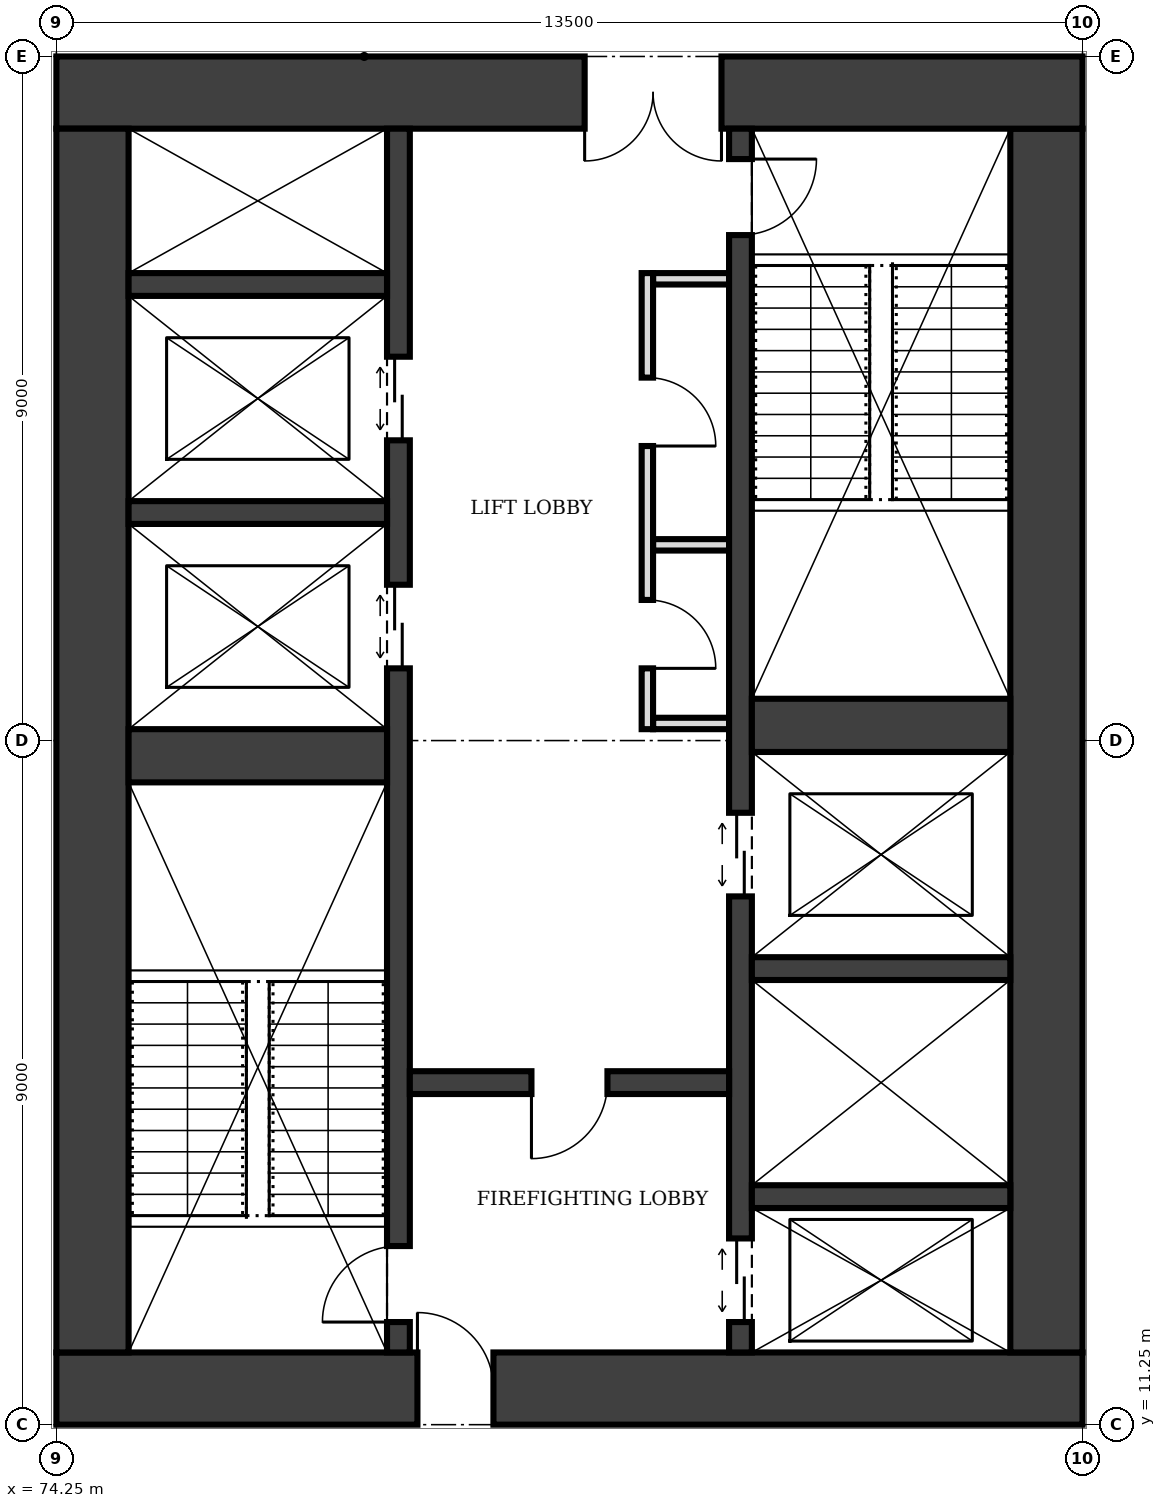
"""IFC4 building model, lengths in metres.
Left out: names, types, materials, properties, quantities, classifications, styles, units other than length and angle.
Written with IfcOpenShell. Run it as: python <this file> out.ifc"""

import sys

from ifc_helpers import new_model, si_unit, direction, frame, frame_2d, origin, place, context, subcontext, project, spatial, rectangle, extrude, element, fill, save


model = new_model("IFC4")
c1 = context("Model", 3, precision=1e-05, world=origin(), true_north=direction((0.0, 1.0)))
c2 = subcontext(c1, "Body", "Model", "MODEL_VIEW")
j1 = project(units=[si_unit("LENGTHUNIT", "METRE"), si_unit("PLANEANGLEUNIT", "RADIAN")], contexts=[c1])
p1 = place(None, origin())
s1 = spatial("IfcSite", under=j1, at=p1, CompositionType="ELEMENT")
p2 = place(p1, origin())
s2 = spatial("IfcBuilding", under=s1, at=p2, CompositionType="ELEMENT")
p3 = place(p2, frame((0.0, 0.0, 29.0)))
s3 = spatial("IfcBuildingStorey", under=s2, at=p3, CompositionType="ELEMENT", Elevation=29.0)
p4 = place(p3, frame((74.25, 11.725, 0.0), z_axis=(0.0, 0.0, 1.0), x_axis=(1.0, 0.0, 0.0)))
e1 = element("IfcWall", 1, at=p4, inside=s3, PredefinedType="SHEAR", context=c2, shape_type="SweptSolid", body=[
    extrude(rectangle(XDim=13.5, YDim=0.95, at=frame_2d((6.75, 0.0))), origin(), (0.0, 0.0, 1.0), 4.0),
])
p5 = place(p4, frame((4.75, 0.0, 0.0)))
e2 = element("IfcOpeningElement", 2, at=p5, cuts=e1, PredefinedType="OPENING", context=c2, shape_type="SweptSolid", body=[
    extrude(rectangle(XDim=1.0, YDim=2.1, at=frame_2d((0.5, 1.05))), frame((0.0, 0.485, 0.0), z_axis=(0.0, -1.0, 0.0), x_axis=(1.0, 0.0, 0.0)), (0.0, 0.0, 1.0), 0.97),
])
p6 = place(p3, frame((87.275, 12.2, 0.0), z_axis=(0.0, 0.0, 1.0), x_axis=(0.0, 1.0, 0.0)))
e3 = element("IfcWall", 3, at=p6, inside=s3, PredefinedType="SHEAR", context=c2, shape_type="SweptSolid", body=[
    extrude(rectangle(XDim=16.1, YDim=0.95, at=frame_2d((8.05, 0.0))), origin(), (0.0, 0.0, 1.0), 4.0),
])
p7 = place(p3, frame((87.75, 28.775, 0.0), z_axis=(0.0, 0.0, 1.0), x_axis=(-1.0, 0.0, 0.0)))
e4 = element("IfcWall", 4, at=p7, inside=s3, PredefinedType="SHEAR", context=c2, shape_type="SweptSolid", body=[
    extrude(rectangle(XDim=13.5, YDim=0.95, at=frame_2d((6.75, 0.0))), origin(), (0.0, 0.0, 1.0), 4.0),
])
p8 = place(p7, frame((4.75, 0.0, 0.0)))
e5 = element("IfcOpeningElement", 5, at=p8, cuts=e4, PredefinedType="OPENING", context=c2, shape_type="SweptSolid", body=[
    extrude(rectangle(XDim=1.8, YDim=2.1, at=frame_2d((0.9, 1.05))), frame((0.0, 0.485, 0.0), z_axis=(0.0, -1.0, 0.0), x_axis=(1.0, 0.0, 0.0)), (0.0, 0.0, 1.0), 0.97),
])
p9 = place(p3, frame((74.725, 28.3, 0.0), z_axis=(0.0, 0.0, 1.0), x_axis=(0.0, -1.0, 0.0)))
e6 = element("IfcWall", 6, at=p9, inside=s3, PredefinedType="SHEAR", context=c2, shape_type="SweptSolid", body=[
    extrude(rectangle(XDim=16.1, YDim=0.95, at=frame_2d((8.05, 0.0))), origin(), (0.0, 0.0, 1.0), 4.0),
])
p10 = place(p3, frame((78.75, 12.2, 0.0), z_axis=(0.0, 0.0, 1.0), x_axis=(0.0, 1.0, 0.0)))
e7 = element("IfcWall", 7, at=p10, inside=s3, PredefinedType="SHEAR", context=c2, shape_type="SweptSolid", body=[
    extrude(rectangle(XDim=16.1, YDim=0.3, at=frame_2d((8.05, 0.0))), origin(), (0.0, 0.0, 1.0), 4.0),
])
p11 = place(p10, frame((0.4, 0.0, 0.0)))
e8 = element("IfcOpeningElement", 8, at=p11, cuts=e7, PredefinedType="OPENING", context=c2, shape_type="SweptSolid", body=[
    extrude(rectangle(XDim=1.0, YDim=2.1, at=frame_2d((0.5, 1.05))), frame((0.0, 0.16, 0.0), z_axis=(0.0, -1.0, 0.0), x_axis=(1.0, 0.0, 0.0)), (0.0, 0.0, 1.0), 0.32),
])
p12 = place(p10, frame((9.0, 0.0, 0.0)))
e9 = element("IfcOpeningElement", 9, at=p12, cuts=e7, PredefinedType="OPENING", context=c2, shape_type="SweptSolid", body=[
    extrude(rectangle(XDim=1.1, YDim=2.1, at=frame_2d((0.55, 1.05))), frame((0.0, 0.16, 0.0), z_axis=(0.0, -1.0, 0.0), x_axis=(1.0, 0.0, 0.0)), (0.0, 0.0, 1.0), 0.32),
])
p13 = place(p10, frame((12.0, 0.0, 0.0)))
e10 = element("IfcOpeningElement", 10, at=p13, cuts=e7, PredefinedType="OPENING", context=c2, shape_type="SweptSolid", body=[
    extrude(rectangle(XDim=1.1, YDim=2.1, at=frame_2d((0.55, 1.05))), frame((0.0, 0.16, 0.0), z_axis=(0.0, -1.0, 0.0), x_axis=(1.0, 0.0, 0.0)), (0.0, 0.0, 1.0), 0.32),
])
p14 = place(p3, frame((83.25, 12.2, 0.0), z_axis=(0.0, 0.0, 1.0), x_axis=(0.0, 1.0, 0.0)))
e11 = element("IfcWall", 11, at=p14, inside=s3, PredefinedType="SHEAR", context=c2, shape_type="SweptSolid", body=[
    extrude(rectangle(XDim=16.1, YDim=0.3, at=frame_2d((8.05, 0.0))), origin(), (0.0, 0.0, 1.0), 4.0),
])
p15 = place(p14, frame((14.7, 0.0, 0.0)))
e12 = element("IfcOpeningElement", 12, at=p15, cuts=e11, PredefinedType="OPENING", context=c2, shape_type="SweptSolid", body=[
    extrude(rectangle(XDim=1.0, YDim=2.1, at=frame_2d((0.5, 1.05))), frame((0.0, 0.16, 0.0), z_axis=(0.0, -1.0, 0.0), x_axis=(1.0, 0.0, 0.0)), (0.0, 0.0, 1.0), 0.32),
])
p16 = place(p14, frame((0.4, 0.0, 0.0)))
e13 = element("IfcOpeningElement", 13, at=p16, cuts=e11, PredefinedType="OPENING", context=c2, shape_type="SweptSolid", body=[
    extrude(rectangle(XDim=1.1, YDim=2.1, at=frame_2d((0.55, 1.05))), frame((0.0, 0.16, 0.0), z_axis=(0.0, -1.0, 0.0), x_axis=(1.0, 0.0, 0.0)), (0.0, 0.0, 1.0), 0.32),
])
p17 = place(p14, frame((6.0, 0.0, 0.0)))
e14 = element("IfcOpeningElement", 14, at=p17, cuts=e11, PredefinedType="OPENING", context=c2, shape_type="SweptSolid", body=[
    extrude(rectangle(XDim=1.1, YDim=2.1, at=frame_2d((0.55, 1.05))), frame((0.0, 0.16, 0.0), z_axis=(0.0, -1.0, 0.0), x_axis=(1.0, 0.0, 0.0)), (0.0, 0.0, 1.0), 0.32),
])
p18 = place(p3, frame((75.2, 20.05, 0.0), z_axis=(0.0, 0.0, 1.0), x_axis=(1.0, 0.0, 0.0)))
e15 = element("IfcWall", 15, at=p18, inside=s3, PredefinedType="SHEAR", context=c2, shape_type="SweptSolid", body=[
    extrude(rectangle(XDim=3.4, YDim=0.7, at=frame_2d((1.7, 0.0))), origin(), (0.0, 0.0, 1.0), 4.0),
])
p19 = place(p3, frame((78.9, 15.75, 0.0), z_axis=(0.0, 0.0, 1.0), x_axis=(1.0, 0.0, 0.0)))
e16 = element("IfcWall", 16, at=p19, inside=s3, PredefinedType="SHEAR", context=c2, shape_type="SweptSolid", body=[
    extrude(rectangle(XDim=4.2, YDim=0.3, at=frame_2d((2.1, 0.0))), origin(), (0.0, 0.0, 1.0), 4.0),
])
p20 = place(p19, frame((1.6, 0.0, 0.0)))
e17 = element("IfcOpeningElement", 17, at=p20, cuts=e16, PredefinedType="OPENING", context=c2, shape_type="SweptSolid", body=[
    extrude(rectangle(XDim=1.0, YDim=2.1, at=frame_2d((0.5, 1.05))), frame((0.0, 0.16, 0.0), z_axis=(0.0, -1.0, 0.0), x_axis=(1.0, 0.0, 0.0)), (0.0, 0.0, 1.0), 0.32),
])
for number, where, z_axis, x_axis in (
    (18, (83.4, 14.25, 0.0), (0.0, 0.0, 1.0), (1.0, 0.0, 0.0)),
    (19, (83.4, 17.25, 0.0), (0.0, 0.0, 1.0), (1.0, 0.0, 0.0)),
):
    element("IfcWall", number, at=place(p3, frame(where, z_axis=z_axis, x_axis=x_axis)), inside=s3, PredefinedType="SHEAR", context=c2, shape_type="SweptSolid", body=[
        extrude(rectangle(XDim=3.4, YDim=0.3, at=frame_2d((1.7, 0.0))), origin(), (0.0, 0.0, 1.0), 4.0),
    ])
p21 = place(p3, frame((83.4, 20.45, 0.0), z_axis=(0.0, 0.0, 1.0), x_axis=(1.0, 0.0, 0.0)))
e20 = element("IfcWall", 20, at=p21, inside=s3, PredefinedType="SHEAR", context=c2, shape_type="SweptSolid", body=[
    extrude(rectangle(XDim=3.4, YDim=0.7, at=frame_2d((1.7, 0.0))), origin(), (0.0, 0.0, 1.0), 4.0),
])
for number, where, z_axis, x_axis in (
    (21, (75.2, 23.25, 0.0), (0.0, 0.0, 1.0), (1.0, 0.0, 0.0)),
    (22, (75.2, 26.25, 0.0), (0.0, 0.0, 1.0), (1.0, 0.0, 0.0)),
):
    element("IfcWall", number, at=place(p3, frame(where, z_axis=z_axis, x_axis=x_axis)), inside=s3, PredefinedType="SHEAR", context=c2, shape_type="SweptSolid", body=[
        extrude(rectangle(XDim=3.4, YDim=0.3, at=frame_2d((1.7, 0.0))), origin(), (0.0, 0.0, 1.0), 4.0),
    ])
p22 = place(p3, frame((82.025, 20.4, 0.0), z_axis=(0.0, 0.0, 1.0), x_axis=(0.0, 1.0, 0.0)))
e23 = element("IfcWall", 23, at=p22, inside=s3, PredefinedType="PARTITIONING", context=c2, shape_type="SweptSolid", body=[
    extrude(rectangle(XDim=6.0, YDim=0.15, at=frame_2d((3.0, 0.0))), origin(), (0.0, 0.0, 1.0), 3.75),
])
p23 = place(p22, frame((0.8, 0.0, 0.0)))
e24 = element("IfcOpeningElement", 24, at=p23, cuts=e23, PredefinedType="OPENING", context=c2, shape_type="SweptSolid", body=[
    extrude(rectangle(XDim=0.9, YDim=2.1, at=frame_2d((0.45, 1.05))), frame((0.0, 0.085, 0.0), z_axis=(0.0, -1.0, 0.0), x_axis=(1.0, 0.0, 0.0)), (0.0, 0.0, 1.0), 0.17),
])
p24 = place(p22, frame((3.725, 0.0, 0.0)))
e25 = element("IfcOpeningElement", 25, at=p24, cuts=e23, PredefinedType="OPENING", context=c2, shape_type="SweptSolid", body=[
    extrude(rectangle(XDim=0.9, YDim=2.1, at=frame_2d((0.45, 1.05))), frame((0.0, 0.085, 0.0), z_axis=(0.0, -1.0, 0.0), x_axis=(1.0, 0.0, 0.0)), (0.0, 0.0, 1.0), 0.17),
])
for number, where, z_axis, x_axis in (
    (26, (82.1, 20.475, 0.0), (0.0, 0.0, 1.0), (1.0, 0.0, 0.0)),
    (27, (82.1, 22.825, 0.0), (0.0, 0.0, 1.0), (1.0, 0.0, 0.0)),
    (28, (82.1, 26.325, 0.0), (0.0, 0.0, 1.0), (1.0, 0.0, 0.0)),
):
    element("IfcWall", number, at=place(p3, frame(where, z_axis=z_axis, x_axis=x_axis)), inside=s3, PredefinedType="PARTITIONING", context=c2, shape_type="SweptSolid", body=[
        extrude(rectangle(XDim=1.0, YDim=0.15, at=frame_2d((0.5, 0.0))), origin(), (0.0, 0.0, 1.0), 3.75),
    ])
p25 = place(p5, origin())
e29 = element("IfcDoor", 29, at=p25, inside=s3, OperationType="SINGLE_SWING_LEFT", PredefinedType="DOOR", context=c2, shape_type="SweptSolid", body=[
    extrude(rectangle(XDim=1.0, YDim=2.1, at=frame_2d((0.5, 1.05))), frame((0.0, 0.025, 0.0), z_axis=(0.0, -1.0, 0.0), x_axis=(1.0, 0.0, 0.0)), (0.0, 0.0, 1.0), 0.05),
])
fill(e2, e29)
p26 = place(p8, origin())
e30 = element("IfcDoor", 30, at=p26, inside=s3, OperationType="DOUBLE_DOOR_SINGLE_SWING", PredefinedType="DOOR", context=c2, shape_type="SweptSolid", body=[
    extrude(rectangle(XDim=1.8, YDim=2.1, at=frame_2d((0.9, 1.05))), frame((0.0, 0.025, 0.0), z_axis=(0.0, -1.0, 0.0), x_axis=(1.0, 0.0, 0.0)), (0.0, 0.0, 1.0), 0.05),
])
fill(e5, e30)
p27 = place(p20, frame((1.0, 0.0, 0.0), z_axis=(0.0, 0.0, 1.0), x_axis=(-1.0, 0.0, 0.0)))
e31 = element("IfcDoor", 31, at=p27, inside=s3, OperationType="SINGLE_SWING_RIGHT", PredefinedType="DOOR", context=c2, shape_type="SweptSolid", body=[
    extrude(rectangle(XDim=1.0, YDim=2.1, at=frame_2d((0.5, 1.05))), frame((0.0, 0.025, 0.0), z_axis=(0.0, -1.0, 0.0), x_axis=(1.0, 0.0, 0.0)), (0.0, 0.0, 1.0), 0.05),
])
fill(e17, e31)
p28 = place(p11, origin())
e32 = element("IfcDoor", 32, at=p28, inside=s3, OperationType="SINGLE_SWING_LEFT", PredefinedType="DOOR", context=c2, shape_type="SweptSolid", body=[
    extrude(rectangle(XDim=1.0, YDim=2.1, at=frame_2d((0.5, 1.05))), frame((0.0, 0.025, 0.0), z_axis=(0.0, -1.0, 0.0), x_axis=(1.0, 0.0, 0.0)), (0.0, 0.0, 1.0), 0.05),
])
fill(e8, e32)
p29 = place(p15, frame((1.0, 0.0, 0.0), z_axis=(0.0, 0.0, 1.0), x_axis=(-1.0, 0.0, 0.0)))
e33 = element("IfcDoor", 33, at=p29, inside=s3, OperationType="SINGLE_SWING_LEFT", PredefinedType="DOOR", context=c2, shape_type="SweptSolid", body=[
    extrude(rectangle(XDim=1.0, YDim=2.1, at=frame_2d((0.5, 1.05))), frame((0.0, 0.025, 0.0), z_axis=(0.0, -1.0, 0.0), x_axis=(1.0, 0.0, 0.0)), (0.0, 0.0, 1.0), 0.05),
])
fill(e12, e33)
p30 = place(p16, origin())
e34 = element("IfcDoor", 34, at=p30, inside=s3, OperationType="DOUBLE_DOOR_SLIDING", PredefinedType="DOOR", context=c2, shape_type="SweptSolid", body=[
    extrude(rectangle(XDim=1.1, YDim=2.1, at=frame_2d((0.55, 1.05))), frame((0.0, 0.025, 0.0), z_axis=(0.0, -1.0, 0.0), x_axis=(1.0, 0.0, 0.0)), (0.0, 0.0, 1.0), 0.05),
])
fill(e13, e34)
p31 = place(p12, origin())
e35 = element("IfcDoor", 35, at=p31, inside=s3, OperationType="DOUBLE_DOOR_SLIDING", PredefinedType="DOOR", context=c2, shape_type="SweptSolid", body=[
    extrude(rectangle(XDim=1.1, YDim=2.1, at=frame_2d((0.55, 1.05))), frame((0.0, 0.025, 0.0), z_axis=(0.0, -1.0, 0.0), x_axis=(1.0, 0.0, 0.0)), (0.0, 0.0, 1.0), 0.05),
])
fill(e9, e35)
p32 = place(p13, origin())
e36 = element("IfcDoor", 36, at=p32, inside=s3, OperationType="DOUBLE_DOOR_SLIDING", PredefinedType="DOOR", context=c2, shape_type="SweptSolid", body=[
    extrude(rectangle(XDim=1.1, YDim=2.1, at=frame_2d((0.55, 1.05))), frame((0.0, 0.025, 0.0), z_axis=(0.0, -1.0, 0.0), x_axis=(1.0, 0.0, 0.0)), (0.0, 0.0, 1.0), 0.05),
])
fill(e10, e36)
p33 = place(p17, origin())
e37 = element("IfcDoor", 37, at=p33, inside=s3, OperationType="DOUBLE_DOOR_SLIDING", PredefinedType="DOOR", context=c2, shape_type="SweptSolid", body=[
    extrude(rectangle(XDim=1.1, YDim=2.1, at=frame_2d((0.55, 1.05))), frame((0.0, 0.025, 0.0), z_axis=(0.0, -1.0, 0.0), x_axis=(1.0, 0.0, 0.0)), (0.0, 0.0, 1.0), 0.05),
])
fill(e14, e37)
p34 = place(p23, frame((0.9, 0.0, 0.0), z_axis=(0.0, 0.0, 1.0), x_axis=(-1.0, 0.0, 0.0)))
e38 = element("IfcDoor", 38, at=p34, inside=s3, OperationType="SINGLE_SWING_RIGHT", PredefinedType="DOOR", context=c2, shape_type="SweptSolid", body=[
    extrude(rectangle(XDim=0.9, YDim=2.1, at=frame_2d((0.45, 1.05))), frame((0.0, 0.025, 0.0), z_axis=(0.0, -1.0, 0.0), x_axis=(1.0, 0.0, 0.0)), (0.0, 0.0, 1.0), 0.05),
])
fill(e24, e38)
p35 = place(p24, frame((0.9, 0.0, 0.0), z_axis=(0.0, 0.0, 1.0), x_axis=(-1.0, 0.0, 0.0)))
e39 = element("IfcDoor", 39, at=p35, inside=s3, OperationType="SINGLE_SWING_RIGHT", PredefinedType="DOOR", context=c2, shape_type="SweptSolid", body=[
    extrude(rectangle(XDim=0.9, YDim=2.1, at=frame_2d((0.45, 1.05))), frame((0.0, 0.025, 0.0), z_axis=(0.0, -1.0, 0.0), x_axis=(1.0, 0.0, 0.0)), (0.0, 0.0, 1.0), 0.05),
])
fill(e25, e39)
save(model, sys.argv[1])
